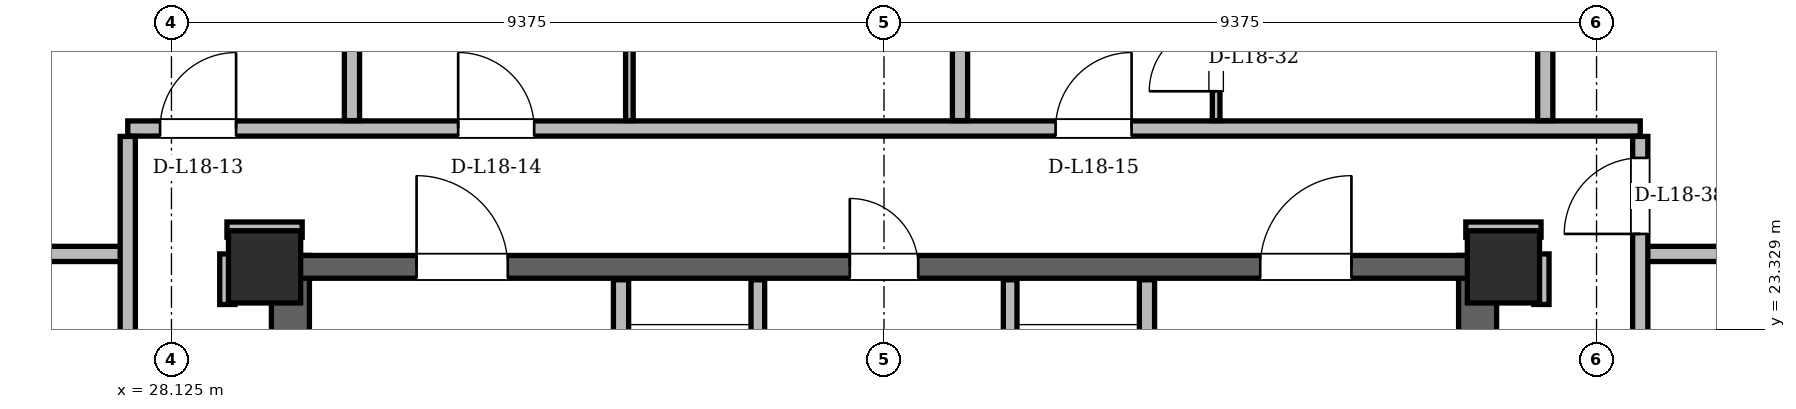
"""IFC4 building model, lengths in metres.
Left out: names, types, materials, properties, quantities, classifications, styles, units other than length and angle.
Written with IfcOpenShell. Run it as: python <this file> out.ifc"""

import sys

from ifc_helpers import new_model, si_unit, direction, frame, frame_2d, origin, origin_2d, place, context, subcontext, project, spatial, rectangle, hollow_rectangle, extrude, element, fill, save


model = new_model("IFC4")
c1 = context("Model", 3, precision=1e-05, world=origin(), true_north=direction((0.0, 1.0)))
c2 = subcontext(c1, "Body", "Model", "MODEL_VIEW")
j1 = project(units=[si_unit("LENGTHUNIT", "METRE"), si_unit("PLANEANGLEUNIT", "RADIAN")], contexts=[c1])
p1 = place(None, origin())
s1 = spatial("IfcSite", under=j1, at=p1, CompositionType="ELEMENT")
p2 = place(p1, origin())
s2 = spatial("IfcBuilding", under=s1, at=p2, CompositionType="ELEMENT")
p3 = place(p2, frame((0.0, 0.0, 70.5)))
s3 = spatial("IfcBuildingStorey", under=s2, at=p3, CompositionType="ELEMENT", Elevation=70.5)
for number, where, z_axis, x_axis in (
    (1, (45.65, 24.15, 0.0), (0.0, 0.0, 1.0), (1.0, 0.0, 0.0)),
    (2, (29.35, 24.15, 0.0), (0.0, 0.0, 1.0), (1.0, 0.0, 0.0)),
):
    element("IfcColumn", number, at=place(p3, frame(where, z_axis=z_axis, x_axis=x_axis)), inside=s3, PredefinedType="COLUMN", context=c2, shape_type="SweptSolid", body=[
        extrude(hollow_rectangle(XDim=0.95, YDim=0.95, WallThickness=0.08, at=origin_2d()), origin(), (0.0, 0.0, 1.0), 3.6),
    ])
for number, where, z_axis, x_axis in (
    (3, (29.69, 11.0, 0.0), (0.0, 0.0, 1.0), (0.0, 1.0, 0.0)),
    (4, (45.31, 11.0, 0.0), (0.0, 0.0, 1.0), (0.0, 1.0, 0.0)),
):
    element("IfcWall", number, at=place(p3, frame(where, z_axis=z_axis, x_axis=x_axis)), inside=s3, PredefinedType="SHEAR", context=c2, shape_type="SweptSolid", body=[
        extrude(rectangle(XDim=13.3, YDim=0.5, at=frame_2d((6.65, 0.0))), origin(), (0.0, 0.0, 1.0), 3.36),
    ])
p4 = place(p3, frame((29.65, 24.15, 0.0), z_axis=(0.0, 0.0, 1.0), x_axis=(1.0, 0.0, 0.0)))
e5 = element("IfcWall", 5, at=p4, inside=s3, PredefinedType="SHEAR", context=c2, shape_type="SweptSolid", body=[
    extrude(rectangle(XDim=15.7, YDim=0.3, at=frame_2d((7.85, 0.0))), origin(), (0.0, 0.0, 1.0), 3.36),
])
p5 = place(p4, frame((1.7, 0.0, 0.0)))
e6 = element("IfcOpeningElement", 6, at=p5, cuts=e5, PredefinedType="OPENING", context=c2, shape_type="SweptSolid", body=[
    extrude(rectangle(XDim=1.2, YDim=2.2, at=frame_2d((0.6, 1.1))), frame((0.0, 0.15, 0.0), z_axis=(0.0, -1.0, 0.0), x_axis=(1.0, 0.0, 0.0)), (0.0, 0.0, 1.0), 0.3),
])
p6 = place(p4, frame((12.8, 0.0, 0.0)))
e7 = element("IfcOpeningElement", 7, at=p6, cuts=e5, PredefinedType="OPENING", context=c2, shape_type="SweptSolid", body=[
    extrude(rectangle(XDim=1.2, YDim=2.2, at=frame_2d((0.6, 1.1))), frame((0.0, 0.15, 0.0), z_axis=(0.0, -1.0, 0.0), x_axis=(1.0, 0.0, 0.0)), (0.0, 0.0, 1.0), 0.3),
])
p7 = place(p4, frame((7.4, 0.0, 0.0)))
e8 = element("IfcOpeningElement", 8, at=p7, cuts=e5, PredefinedType="OPENING", context=c2, shape_type="SweptSolid", body=[
    extrude(rectangle(XDim=0.9, YDim=2.05, at=frame_2d((0.45, 1.025))), frame((0.0, 0.15, 0.0), z_axis=(0.0, -1.0, 0.0), x_axis=(1.0, 0.0, 0.0)), (0.0, 0.0, 1.0), 0.3),
])
p8 = place(p3, frame((34.04, 19.48, 0.0), z_axis=(0.0, 0.0, 1.0), x_axis=(0.0, 1.0, 0.0)))
e9 = element("IfcWall", 9, at=p8, inside=s3, PredefinedType="PARTITIONING", context=c2, shape_type="SweptSolid", body=[
    extrude(rectangle(XDim=4.5, YDim=0.2, at=frame_2d((2.25, 0.0))), origin(), (0.0, 0.0, 1.0), 2.4),
])
p9 = place(p8, frame((2.12, 0.0, 0.0)))
e10 = element("IfcOpeningElement", 10, at=p9, cuts=e9, PredefinedType="OPENING", context=c2, shape_type="SweptSolid", body=[
    extrude(rectangle(XDim=1.1, YDim=2.2, at=frame_2d((0.55, 1.1))), frame((0.0, 0.1, 0.0), z_axis=(0.0, -1.0, 0.0), x_axis=(1.0, 0.0, 0.0)), (0.0, 0.0, 1.0), 0.2),
])
p10 = place(p3, frame((35.84, 20.96, 0.0), z_axis=(0.0, 0.0, 1.0), x_axis=(0.0, 1.0, 0.0)))
e11 = element("IfcWall", 11, at=p10, inside=s3, PredefinedType="PARTITIONING", context=c2, shape_type="SweptSolid", body=[
    extrude(rectangle(XDim=3.02, YDim=0.18, at=frame_2d((1.51, 0.0))), origin(), (0.0, 0.0, 1.0), 2.4),
])
p11 = place(p3, frame((40.96, 19.48, 0.0), z_axis=(0.0, 0.0, 1.0), x_axis=(0.0, 1.0, 0.0)))
e12 = element("IfcWall", 12, at=p11, inside=s3, PredefinedType="PARTITIONING", context=c2, shape_type="SweptSolid", body=[
    extrude(rectangle(XDim=4.5, YDim=0.2, at=frame_2d((2.25, 0.0))), origin(), (0.0, 0.0, 1.0), 2.4),
])
p12 = place(p11, frame((2.12, 0.0, 0.0)))
e13 = element("IfcOpeningElement", 13, at=p12, cuts=e12, PredefinedType="OPENING", context=c2, shape_type="SweptSolid", body=[
    extrude(rectangle(XDim=1.1, YDim=2.2, at=frame_2d((0.55, 1.1))), frame((0.0, 0.1, 0.0), z_axis=(0.0, -1.0, 0.0), x_axis=(1.0, 0.0, 0.0)), (0.0, 0.0, 1.0), 0.2),
])
p13 = place(p3, frame((39.16, 20.96, 0.0), z_axis=(0.0, 0.0, 1.0), x_axis=(0.0, 1.0, 0.0)))
e14 = element("IfcWall", 14, at=p13, inside=s3, PredefinedType="PARTITIONING", context=c2, shape_type="SweptSolid", body=[
    extrude(rectangle(XDim=3.02, YDim=0.18, at=frame_2d((1.51, 0.0))), origin(), (0.0, 0.0, 1.0), 2.4),
])
for number, where, z_axis, x_axis in (
    (15, (19.885, 24.32, 0.0), (0.0, 0.0, 1.0), (1.0, 0.0, 0.0)),
    (16, (47.45, 24.32, 0.0), (0.0, 0.0, 1.0), (1.0, 0.0, 0.0)),
):
    element("IfcWall", number, at=place(p3, frame(where, z_axis=z_axis, x_axis=x_axis)), inside=s3, PredefinedType="PARTITIONING", context=c2, shape_type="SweptSolid", body=[
        extrude(rectangle(XDim=7.666, YDim=0.2, at=frame_2d((3.833, 0.0))), origin(), (0.0, 0.0, 1.0), 2.494),
    ])
for number, where, z_axis, x_axis in (
    (17, (28.855, 24.64, 0.0), (0.0, 0.0, 1.0), (1.0, 0.0, 0.0)),
    (18, (45.155, 24.64, 0.0), (0.0, 0.0, 1.0), (1.0, 0.0, 0.0)),
):
    element("IfcWall", number, at=place(p3, frame(where, z_axis=z_axis, x_axis=x_axis)), inside=s3, PredefinedType="PARTITIONING", context=c2, shape_type="SweptSolid", body=[
        extrude(rectangle(XDim=0.99, YDim=0.2, at=frame_2d((0.495, 0.0))), origin(), (0.0, 0.0, 1.0), 2.738),
    ])
p14 = place(p3, frame((27.55, 25.97, 0.0), z_axis=(0.0, 0.0, 1.0), x_axis=(1.0, 0.0, 0.0)))
e19 = element("IfcWall", 19, at=p14, inside=s3, PredefinedType="PARTITIONING", context=c2, shape_type="SweptSolid", body=[
    extrude(rectangle(XDim=19.9, YDim=0.2, at=frame_2d((9.95, 0.0))), origin(), (0.0, 0.0, 1.0), 2.738),
])
p15 = place(p14, frame((0.425, 0.0, 0.0)))
e20 = element("IfcOpeningElement", 20, at=p15, cuts=e19, PredefinedType="OPENING", context=c2, shape_type="SweptSolid", body=[
    extrude(rectangle(XDim=1.0, YDim=2.18, at=frame_2d((0.5, 1.09))), frame((0.0, 0.1, 0.0), z_axis=(0.0, -1.0, 0.0), x_axis=(1.0, 0.0, 0.0)), (0.0, 0.0, 1.0), 0.2),
])
p16 = place(p14, frame((4.347, 0.0, 0.0)))
e21 = element("IfcOpeningElement", 21, at=p16, cuts=e19, PredefinedType="OPENING", context=c2, shape_type="SweptSolid", body=[
    extrude(rectangle(XDim=1.0, YDim=2.18, at=frame_2d((0.5, 1.09))), frame((0.0, 0.1, 0.0), z_axis=(0.0, -1.0, 0.0), x_axis=(1.0, 0.0, 0.0)), (0.0, 0.0, 1.0), 0.2),
])
p17 = place(p14, frame((12.208, 0.0, 0.0)))
e22 = element("IfcOpeningElement", 22, at=p17, cuts=e19, PredefinedType="OPENING", context=c2, shape_type="SweptSolid", body=[
    extrude(rectangle(XDim=1.0, YDim=2.18, at=frame_2d((0.5, 1.09))), frame((0.0, 0.1, 0.0), z_axis=(0.0, -1.0, 0.0), x_axis=(1.0, 0.0, 0.0)), (0.0, 0.0, 1.0), 0.2),
])
p18 = place(p3, frame((27.55, 11.054, 0.0), z_axis=(0.0, 0.0, 1.0), x_axis=(0.0, 1.0, 0.0)))
e23 = element("IfcWall", 23, at=p18, inside=s3, PredefinedType="PARTITIONING", context=c2, shape_type="SweptSolid", body=[
    extrude(rectangle(XDim=14.812, YDim=0.2, at=frame_2d((7.406, 0.0))), origin(), (0.0, 0.0, 1.0), 2.738),
])
p19 = place(p18, frame((6.031, 0.0, 0.0)))
e24 = element("IfcOpeningElement", 24, at=p19, cuts=e23, PredefinedType="OPENING", context=c2, shape_type="SweptSolid", body=[
    extrude(rectangle(XDim=1.0, YDim=2.18, at=frame_2d((0.5, 1.09))), frame((0.0, 0.1, 0.0), z_axis=(0.0, -1.0, 0.0), x_axis=(1.0, 0.0, 0.0)), (0.0, 0.0, 1.0), 0.2),
])
p20 = place(p3, frame((28.86, 23.655, 0.0), z_axis=(0.0, 0.0, 1.0), x_axis=(0.0, 1.0, 0.0)))
e25 = element("IfcWall", 25, at=p20, inside=s3, PredefinedType="PARTITIONING", context=c2, shape_type="SweptSolid", body=[
    extrude(rectangle(XDim=0.665, YDim=0.2, at=frame_2d((0.333, 0.0))), origin(), (0.0, 0.0, 1.0), 2.946),
])
p21 = place(p3, frame((30.5, 26.074, 0.0), z_axis=(0.0, 0.0, 1.0), x_axis=(0.0, 1.0, 0.0)))
e26 = element("IfcWall", 26, at=p21, inside=s3, PredefinedType="PARTITIONING", context=c2, shape_type="SweptSolid", body=[
    extrude(rectangle(XDim=16.632, YDim=0.2, at=frame_2d((8.316, 0.0))), origin(), (0.0, 0.0, 1.0), 2.494),
])
p22 = place(p3, frame((34.15, 26.074, 0.0), z_axis=(0.0, 0.0, 1.0), x_axis=(0.0, 1.0, 0.0)))
e27 = element("IfcWall", 27, at=p22, inside=s3, PredefinedType="PARTITIONING", context=c2, shape_type="SweptSolid", body=[
    extrude(rectangle(XDim=17.28, YDim=0.1, at=frame_2d((8.64, 0.0))), origin(), (0.0, 0.0, 1.0), 3.36),
])
p23 = place(p22, frame((1.431, 0.0, 0.0)))
e28 = element("IfcOpeningElement", 28, at=p23, cuts=e27, PredefinedType="OPENING", context=c2, shape_type="SweptSolid", body=[
    extrude(rectangle(XDim=0.92, YDim=2.12, at=frame_2d((0.46, 1.06))), frame((0.0, 0.05, 0.0), z_axis=(0.0, -1.0, 0.0), x_axis=(1.0, 0.0, 0.0)), (0.0, 0.0, 1.0), 0.1),
])
p24 = place(p22, frame((5.345, 0.0, 0.0)))
e29 = element("IfcOpeningElement", 29, at=p24, cuts=e27, PredefinedType="OPENING", context=c2, shape_type="SweptSolid", body=[
    extrude(rectangle(XDim=0.92, YDim=2.12, at=frame_2d((0.46, 1.06))), frame((0.0, 0.05, 0.0), z_axis=(0.0, -1.0, 0.0), x_axis=(1.0, 0.0, 0.0)), (0.0, 0.0, 1.0), 0.1),
])
p25 = place(p22, frame((8.705, 0.0, 0.0)))
e30 = element("IfcOpeningElement", 30, at=p25, cuts=e27, PredefinedType="OPENING", context=c2, shape_type="SweptSolid", body=[
    extrude(rectangle(XDim=0.95, YDim=2.1, at=frame_2d((0.475, 1.05))), frame((0.0, 0.05, 0.0), z_axis=(0.0, -1.0, 0.0), x_axis=(1.0, 0.0, 0.0)), (0.0, 0.0, 1.0), 0.1),
])
p26 = place(p22, frame((11.539, 0.0, 0.0)))
e31 = element("IfcOpeningElement", 31, at=p26, cuts=e27, PredefinedType="OPENING", context=c2, shape_type="SweptSolid", body=[
    extrude(rectangle(XDim=0.95, YDim=2.1, at=frame_2d((0.475, 1.05))), frame((0.0, 0.05, 0.0), z_axis=(0.0, -1.0, 0.0), x_axis=(1.0, 0.0, 0.0)), (0.0, 0.0, 1.0), 0.1),
])
p27 = place(p22, frame((13.914, 0.0, 0.0)))
e32 = element("IfcOpeningElement", 32, at=p27, cuts=e27, PredefinedType="OPENING", context=c2, shape_type="SweptSolid", body=[
    extrude(rectangle(XDim=0.95, YDim=2.1, at=frame_2d((0.475, 1.05))), frame((0.0, 0.05, 0.0), z_axis=(0.0, -1.0, 0.0), x_axis=(1.0, 0.0, 0.0)), (0.0, 0.0, 1.0), 0.1),
])
p28 = place(p22, frame((15.934, 0.0, 0.0)))
e33 = element("IfcOpeningElement", 33, at=p28, cuts=e27, PredefinedType="OPENING", context=c2, shape_type="SweptSolid", body=[
    extrude(rectangle(XDim=0.88, YDim=2.08, at=frame_2d((0.44, 1.04))), frame((0.0, 0.05, 0.0), z_axis=(0.0, -1.0, 0.0), x_axis=(1.0, 0.0, 0.0)), (0.0, 0.0, 1.0), 0.1),
])
p29 = place(p3, frame((38.5, 26.074, 0.0), z_axis=(0.0, 0.0, 1.0), x_axis=(0.0, 1.0, 0.0)))
e34 = element("IfcWall", 34, at=p29, inside=s3, PredefinedType="PARTITIONING", context=c2, shape_type="SweptSolid", body=[
    extrude(rectangle(XDim=17.28, YDim=0.2, at=frame_2d((8.64, 0.0))), origin(), (0.0, 0.0, 1.0), 3.36),
])
p30 = place(p3, frame((41.87, 26.074, 0.0), z_axis=(0.0, 0.0, 1.0), x_axis=(0.0, 1.0, 0.0)))
e35 = element("IfcWall", 35, at=p30, inside=s3, PredefinedType="PARTITIONING", context=c2, shape_type="SweptSolid", body=[
    extrude(rectangle(XDim=17.28, YDim=0.1, at=frame_2d((8.64, 0.0))), origin(), (0.0, 0.0, 1.0), 3.36),
])
p31 = place(p30, frame((0.386, 0.0, 0.0)))
e36 = element("IfcOpeningElement", 36, at=p31, cuts=e35, PredefinedType="OPENING", context=c2, shape_type="SweptSolid", body=[
    extrude(rectangle(XDim=0.88, YDim=2.08, at=frame_2d((0.44, 1.04))), frame((0.0, 0.05, 0.0), z_axis=(0.0, -1.0, 0.0), x_axis=(1.0, 0.0, 0.0)), (0.0, 0.0, 1.0), 0.1),
])
p32 = place(p30, frame((2.336, 0.0, 0.0)))
e37 = element("IfcOpeningElement", 37, at=p32, cuts=e35, PredefinedType="OPENING", context=c2, shape_type="SweptSolid", body=[
    extrude(rectangle(XDim=0.95, YDim=2.1, at=frame_2d((0.475, 1.05))), frame((0.0, 0.05, 0.0), z_axis=(0.0, -1.0, 0.0), x_axis=(1.0, 0.0, 0.0)), (0.0, 0.0, 1.0), 0.1),
])
p33 = place(p30, frame((4.711, 0.0, 0.0)))
e38 = element("IfcOpeningElement", 38, at=p33, cuts=e35, PredefinedType="OPENING", context=c2, shape_type="SweptSolid", body=[
    extrude(rectangle(XDim=0.95, YDim=2.1, at=frame_2d((0.475, 1.05))), frame((0.0, 0.05, 0.0), z_axis=(0.0, -1.0, 0.0), x_axis=(1.0, 0.0, 0.0)), (0.0, 0.0, 1.0), 0.1),
])
p34 = place(p30, frame((7.545, 0.0, 0.0)))
e39 = element("IfcOpeningElement", 39, at=p34, cuts=e35, PredefinedType="OPENING", context=c2, shape_type="SweptSolid", body=[
    extrude(rectangle(XDim=0.95, YDim=2.1, at=frame_2d((0.475, 1.05))), frame((0.0, 0.05, 0.0), z_axis=(0.0, -1.0, 0.0), x_axis=(1.0, 0.0, 0.0)), (0.0, 0.0, 1.0), 0.1),
])
p35 = place(p30, frame((10.935, 0.0, 0.0)))
e40 = element("IfcOpeningElement", 40, at=p35, cuts=e35, PredefinedType="OPENING", context=c2, shape_type="SweptSolid", body=[
    extrude(rectangle(XDim=0.92, YDim=2.12, at=frame_2d((0.46, 1.06))), frame((0.0, 0.05, 0.0), z_axis=(0.0, -1.0, 0.0), x_axis=(1.0, 0.0, 0.0)), (0.0, 0.0, 1.0), 0.1),
])
p36 = place(p30, frame((14.849, 0.0, 0.0)))
e41 = element("IfcOpeningElement", 41, at=p36, cuts=e35, PredefinedType="OPENING", context=c2, shape_type="SweptSolid", body=[
    extrude(rectangle(XDim=0.92, YDim=2.12, at=frame_2d((0.46, 1.06))), frame((0.0, 0.05, 0.0), z_axis=(0.0, -1.0, 0.0), x_axis=(1.0, 0.0, 0.0)), (0.0, 0.0, 1.0), 0.1),
])
p37 = place(p3, frame((46.15, 23.655, 0.0), z_axis=(0.0, 0.0, 1.0), x_axis=(0.0, 1.0, 0.0)))
e42 = element("IfcWall", 42, at=p37, inside=s3, PredefinedType="PARTITIONING", context=c2, shape_type="SweptSolid", body=[
    extrude(rectangle(XDim=0.665, YDim=0.2, at=frame_2d((0.333, 0.0))), origin(), (0.0, 0.0, 1.0), 2.946),
])
p38 = place(p3, frame((46.2, 26.074, 0.0), z_axis=(0.0, 0.0, 1.0), x_axis=(0.0, 1.0, 0.0)))
e43 = element("IfcWall", 43, at=p38, inside=s3, PredefinedType="PARTITIONING", context=c2, shape_type="SweptSolid", body=[
    extrude(rectangle(XDim=13.688, YDim=0.2, at=frame_2d((6.844, 0.0))), origin(), (0.0, 0.0, 1.0), 2.494),
])
p39 = place(p3, frame((47.45, 11.054, 0.0), z_axis=(0.0, 0.0, 1.0), x_axis=(0.0, 1.0, 0.0)))
e44 = element("IfcWall", 44, at=p39, inside=s3, PredefinedType="PARTITIONING", context=c2, shape_type="SweptSolid", body=[
    extrude(rectangle(XDim=14.812, YDim=0.2, at=frame_2d((7.406, 0.0))), origin(), (0.0, 0.0, 1.0), 2.738),
])
p40 = place(p39, frame((13.529, 0.0, 0.0)))
e45 = element("IfcOpeningElement", 45, at=p40, cuts=e44, PredefinedType="OPENING", context=c2, shape_type="SweptSolid", body=[
    extrude(rectangle(XDim=1.0, YDim=2.18, at=frame_2d((0.5, 1.09))), frame((0.0, 0.1, 0.0), z_axis=(0.0, -1.0, 0.0), x_axis=(1.0, 0.0, 0.0)), (0.0, 0.0, 1.0), 0.2),
])
p41 = place(p5, origin())
e46 = element("IfcDoor", 46, at=p41, inside=s3, OperationType="SINGLE_SWING_LEFT", PredefinedType="DOOR", context=c2, shape_type="SweptSolid", body=[
    extrude(rectangle(XDim=1.2, YDim=2.2, at=frame_2d((0.6, 1.1))), frame((0.0, 0.025, 0.0), z_axis=(0.0, -1.0, 0.0), x_axis=(1.0, 0.0, 0.0)), (0.0, 0.0, 1.0), 0.05),
])
fill(e6, e46)
p42 = place(p6, origin())
e47 = element("IfcDoor", 47, at=p42, inside=s3, OperationType="SINGLE_SWING_RIGHT", PredefinedType="DOOR", context=c2, shape_type="SweptSolid", body=[
    extrude(rectangle(XDim=1.2, YDim=2.2, at=frame_2d((0.6, 1.1))), frame((0.0, 0.025, 0.0), z_axis=(0.0, -1.0, 0.0), x_axis=(1.0, 0.0, 0.0)), (0.0, 0.0, 1.0), 0.05),
])
fill(e7, e47)
p43 = place(p7, origin())
e48 = element("IfcDoor", 48, at=p43, inside=s3, OperationType="SINGLE_SWING_LEFT", PredefinedType="DOOR", context=c2, shape_type="SweptSolid", body=[
    extrude(rectangle(XDim=0.9, YDim=2.05, at=frame_2d((0.45, 1.025))), frame((0.0, 0.025, 0.0), z_axis=(0.0, -1.0, 0.0), x_axis=(1.0, 0.0, 0.0)), (0.0, 0.0, 1.0), 0.05),
])
fill(e8, e48)
p44 = place(p15, origin())
e49 = element("IfcDoor", 49, at=p44, inside=s3, OperationType="SINGLE_SWING_RIGHT", PredefinedType="DOOR", context=c2, shape_type="SweptSolid", body=[
    extrude(rectangle(XDim=1.0, YDim=2.18, at=frame_2d((0.5, 1.09))), frame((0.0, 0.025, 0.0), z_axis=(0.0, -1.0, 0.0), x_axis=(1.0, 0.0, 0.0)), (0.0, 0.0, 1.0), 0.05),
])
fill(e20, e49)
p45 = place(p16, origin())
e50 = element("IfcDoor", 50, at=p45, inside=s3, OperationType="SINGLE_SWING_LEFT", PredefinedType="DOOR", context=c2, shape_type="SweptSolid", body=[
    extrude(rectangle(XDim=1.0, YDim=2.18, at=frame_2d((0.5, 1.09))), frame((0.0, 0.025, 0.0), z_axis=(0.0, -1.0, 0.0), x_axis=(1.0, 0.0, 0.0)), (0.0, 0.0, 1.0), 0.05),
])
fill(e21, e50)
p46 = place(p17, origin())
e51 = element("IfcDoor", 51, at=p46, inside=s3, OperationType="SINGLE_SWING_RIGHT", PredefinedType="DOOR", context=c2, shape_type="SweptSolid", body=[
    extrude(rectangle(XDim=1.0, YDim=2.18, at=frame_2d((0.5, 1.09))), frame((0.0, 0.025, 0.0), z_axis=(0.0, -1.0, 0.0), x_axis=(1.0, 0.0, 0.0)), (0.0, 0.0, 1.0), 0.05),
])
fill(e22, e51)
p47 = place(p31, origin())
e52 = element("IfcDoor", 52, at=p47, inside=s3, OperationType="SINGLE_SWING_LEFT", PredefinedType="DOOR", context=c2, shape_type="SweptSolid", body=[
    extrude(rectangle(XDim=0.88, YDim=2.08, at=frame_2d((0.44, 1.04))), frame((0.0, 0.025, 0.0), z_axis=(0.0, -1.0, 0.0), x_axis=(1.0, 0.0, 0.0)), (0.0, 0.0, 1.0), 0.05),
])
fill(e36, e52)
p48 = place(p40, origin())
e53 = element("IfcDoor", 53, at=p48, inside=s3, OperationType="SINGLE_SWING_LEFT", PredefinedType="DOOR", context=c2, shape_type="SweptSolid", body=[
    extrude(rectangle(XDim=1.0, YDim=2.18, at=frame_2d((0.5, 1.09))), frame((0.0, 0.025, 0.0), z_axis=(0.0, -1.0, 0.0), x_axis=(1.0, 0.0, 0.0)), (0.0, 0.0, 1.0), 0.05),
])
fill(e45, e53)
save(model, sys.argv[1])
